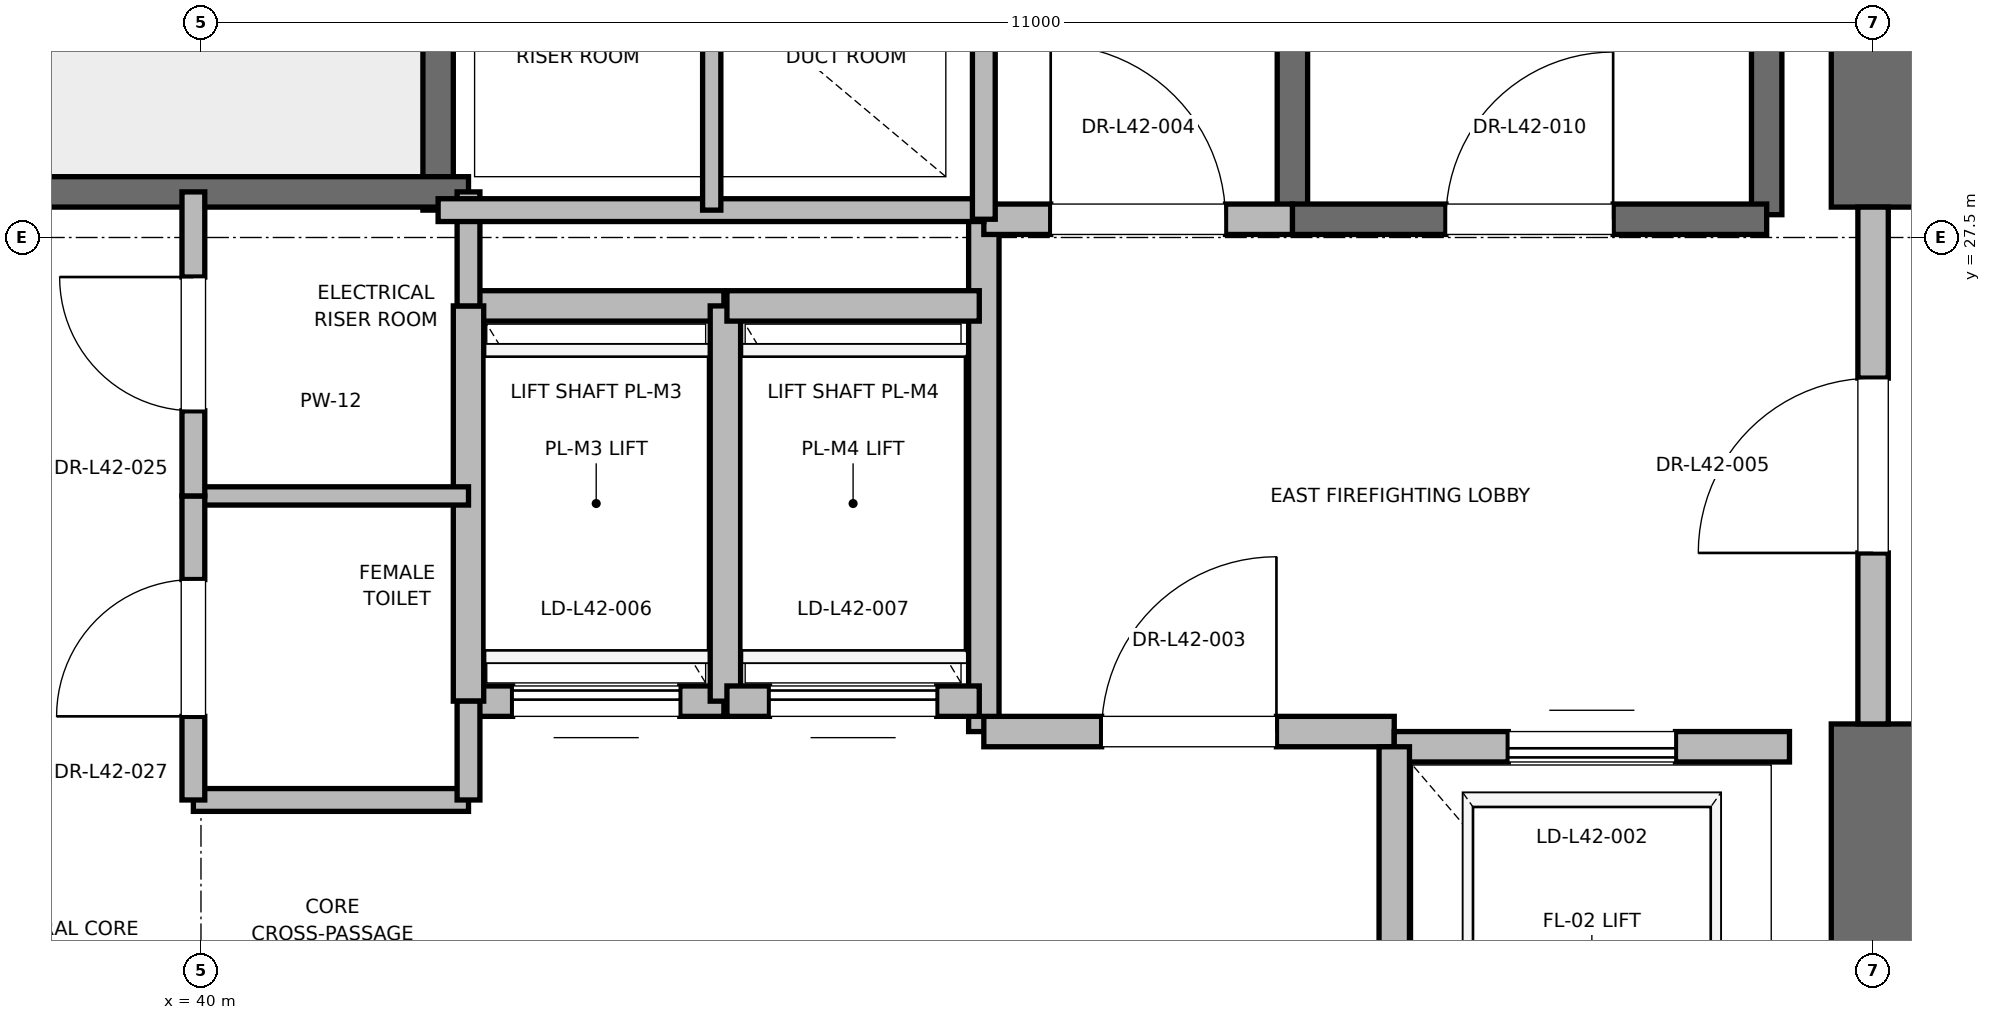
"""IFC4 building model, lengths in metres.
Left out: names, types, materials, properties, quantities, classifications, styles, units other than length and angle.
Written with IfcOpenShell. Run it as: python <this file> out.ifc"""

import sys

from ifc_helpers import new_model, si_unit, direction, frame, frame_2d, origin, place, context, subcontext, project, spatial, rectangle, extrude, element, fill, save


model = new_model("IFC4")
c1 = context("Model", 3, precision=1e-05, world=origin(), true_north=direction((0.0, 1.0)))
c2 = subcontext(c1, "Body", "Model", "MODEL_VIEW")
j1 = project(units=[si_unit("LENGTHUNIT", "METRE"), si_unit("PLANEANGLEUNIT", "RADIAN")], contexts=[c1])
p1 = place(None, origin())
s1 = spatial("IfcSite", under=j1, at=p1, CompositionType="ELEMENT")
p2 = place(p1, origin())
s2 = spatial("IfcBuilding", under=s1, at=p2, CompositionType="ELEMENT")
p3 = place(p2, frame((0.0, 0.0, 180.4)))
s3 = spatial("IfcBuildingStorey", under=s2, at=p3, CompositionType="ELEMENT", Elevation=180.4)
p4 = place(p3, frame((51.0, 18.5, 0.0), z_axis=(0.0, 0.0, 1.0), x_axis=(0.0, 1.0, 0.0)))
e1 = element("IfcWall", 1, at=p4, inside=s3, PredefinedType="SHEAR", context=c2, shape_type="SweptSolid", body=[
    extrude(rectangle(XDim=5.8, YDim=0.55, at=frame_2d((2.9, 0.0))), origin(), (0.0, 0.0, 1.0), 3.7),
])
p5 = place(p3, frame((51.0, 27.7, 0.0), z_axis=(0.0, 0.0, 1.0), x_axis=(0.0, 1.0, 0.0)))
e2 = element("IfcWall", 2, at=p5, inside=s3, PredefinedType="SHEAR", context=c2, shape_type="SweptSolid", body=[
    extrude(rectangle(XDim=8.8, YDim=0.55, at=frame_2d((4.4, 0.0))), origin(), (0.0, 0.0, 1.0), 3.7),
])
p6 = place(p3, frame((50.3, 27.65, 0.0), z_axis=(0.0, 0.0, 1.0), x_axis=(0.0, 1.0, 0.0)))
e3 = element("IfcWall", 3, at=p6, inside=s3, PredefinedType="SOLIDWALL", context=c2, shape_type="SweptSolid", body=[
    extrude(rectangle(XDim=8.15, YDim=0.2, at=frame_2d((4.075, 0.0))), origin(), (0.0, 0.0, 1.0), 3.7),
])
p7 = place(p3, frame((47.18, 27.62, 0.0), z_axis=(0.0, 0.0, 1.0), x_axis=(0.0, 1.0, 0.0)))
e4 = element("IfcWall", 4, at=p7, inside=s3, PredefinedType="SOLIDWALL", context=c2, shape_type="SweptSolid", body=[
    extrude(rectangle(XDim=8.18, YDim=0.2, at=frame_2d((4.09, 0.0))), origin(), (0.0, 0.0, 1.0), 3.7),
])
p8 = place(p3, frame((47.18, 27.62, 0.0), z_axis=(0.0, 0.0, 1.0), x_axis=(1.0, 0.0, 0.0)))
e5 = element("IfcWall", 5, at=p8, inside=s3, PredefinedType="SOLIDWALL", context=c2, shape_type="SweptSolid", body=[
    extrude(rectangle(XDim=3.12, YDim=0.2, at=frame_2d((1.56, 0.0))), origin(), (0.0, 0.0, 1.0), 3.7),
])
p9 = place(p8, frame((1.01, 0.0, 0.0)))
e6 = element("IfcOpeningElement", 6, at=p9, cuts=e5, PredefinedType="OPENING", context=c2, shape_type="SweptSolid", body=[
    extrude(rectangle(XDim=1.1, YDim=2.15, at=frame_2d((0.55, 1.075))), frame((0.0, 0.1, 0.0), z_axis=(0.0, -1.0, 0.0), x_axis=(1.0, 0.0, 0.0)), (0.0, 0.0, 1.0), 0.2),
])
p10 = place(p3, frame((41.56, 27.68, 0.0), z_axis=(0.0, 0.0, 1.0), x_axis=(0.0, 1.0, 0.0)))
e7 = element("IfcWall", 7, at=p10, inside=s3, PredefinedType="SOLIDWALL", context=c2, shape_type="SweptSolid", body=[
    extrude(rectangle(XDim=8.57, YDim=0.2, at=frame_2d((4.285, 0.0))), origin(), (0.0, 0.0, 1.0), 3.7),
])
p11 = place(p3, frame((38.44, 27.8, 0.0), z_axis=(0.0, 0.0, 1.0), x_axis=(1.0, 0.0, 0.0)))
e8 = element("IfcWall", 8, at=p11, inside=s3, PredefinedType="SOLIDWALL", context=c2, shape_type="SweptSolid", body=[
    extrude(rectangle(XDim=3.32, YDim=0.2, at=frame_2d((1.66, 0.0))), origin(), (0.0, 0.0, 1.0), 3.7),
])
p12 = place(p3, frame((45.15, 24.25, 0.0), z_axis=(0.0, 0.0, 1.0), x_axis=(0.0, 1.0, 0.0)))
e9 = element("IfcWall", 9, at=p12, inside=s3, PredefinedType="PARTITIONING", context=c2, shape_type="SweptSolid", body=[
    extrude(rectangle(XDim=3.37, YDim=0.2, at=frame_2d((1.685, 0.0))), origin(), (0.0, 0.0, 1.0), 3.7),
])
p13 = place(p3, frame((45.15, 24.25, 0.0), z_axis=(0.0, 0.0, 1.0), x_axis=(1.0, 0.0, 0.0)))
e10 = element("IfcWall", 10, at=p13, inside=s3, PredefinedType="PARTITIONING", context=c2, shape_type="SweptSolid", body=[
    extrude(rectangle(XDim=2.7, YDim=0.2, at=frame_2d((1.35, 0.0))), origin(), (0.0, 0.0, 1.0), 3.7),
])
p14 = place(p13, frame((0.775, 0.0, 0.0)))
e11 = element("IfcOpeningElement", 11, at=p14, cuts=e10, PredefinedType="OPENING", context=c2, shape_type="SweptSolid", body=[
    extrude(rectangle(XDim=1.15, YDim=2.2, at=frame_2d((0.575, 1.1))), frame((0.0, 0.1, 0.0), z_axis=(0.0, -1.0, 0.0), x_axis=(1.0, 0.0, 0.0)), (0.0, 0.0, 1.0), 0.2),
])
p15 = place(p3, frame((45.15, 27.62, 0.0), z_axis=(0.0, 0.0, 1.0), x_axis=(1.0, 0.0, 0.0)))
e12 = element("IfcWall", 12, at=p15, inside=s3, PredefinedType="PARTITIONING", context=c2, shape_type="SweptSolid", body=[
    extrude(rectangle(XDim=2.03, YDim=0.2, at=frame_2d((1.015, 0.0))), origin(), (0.0, 0.0, 1.0), 3.7),
])
p16 = place(p15, frame((0.44, 0.0, 0.0)))
e13 = element("IfcOpeningElement", 13, at=p16, cuts=e12, PredefinedType="OPENING", context=c2, shape_type="SweptSolid", body=[
    extrude(rectangle(XDim=1.15, YDim=2.2, at=frame_2d((0.575, 1.1))), frame((0.0, 0.1, 0.0), z_axis=(0.0, -1.0, 0.0), x_axis=(1.0, 0.0, 0.0)), (0.0, 0.0, 1.0), 0.2),
])
p17 = place(p3, frame((51.0, 24.3, 0.0), z_axis=(0.0, 0.0, 1.0), x_axis=(0.0, 1.0, 0.0)))
e14 = element("IfcWall", 14, at=p17, inside=s3, PredefinedType="PARTITIONING", context=c2, shape_type="SweptSolid", body=[
    extrude(rectangle(XDim=3.4, YDim=0.2, at=frame_2d((1.7, 0.0))), origin(), (0.0, 0.0, 1.0), 2.68),
])
p18 = place(p17, frame((1.125, 0.0, 0.0)))
e15 = element("IfcOpeningElement", 15, at=p18, cuts=e14, PredefinedType="OPENING", context=c2, shape_type="SweptSolid", body=[
    extrude(rectangle(XDim=1.15, YDim=2.2, at=frame_2d((0.575, 1.1))), frame((0.0, 0.1, 0.0), z_axis=(0.0, -1.0, 0.0), x_axis=(1.0, 0.0, 0.0)), (0.0, 0.0, 1.0), 0.2),
])
p19 = place(p3, frame((50.45, 24.15, 0.0), z_axis=(0.0, 0.0, 1.0), x_axis=(-1.0, 0.0, 0.0)))
e16 = element("IfcWall", 16, at=p19, inside=s3, PredefinedType="SOLIDWALL", context=c2, shape_type="SweptSolid", body=[
    extrude(rectangle(XDim=2.6, YDim=0.2, at=frame_2d((1.3, 0.0))), origin(), (0.0, 0.0, 1.0), 2.68),
])
p20 = place(p19, frame((0.75, 0.0, 0.0)))
e17 = element("IfcOpeningElement", 17, at=p20, cuts=e16, PredefinedType="OPENING", context=c2, shape_type="SweptSolid", body=[
    extrude(rectangle(XDim=1.1, YDim=2.2, at=frame_2d((0.55, 1.1))), frame((0.0, 0.1, 0.0), z_axis=(0.0, -1.0, 0.0), x_axis=(1.0, 0.0, 0.0)), (0.0, 0.0, 1.0), 0.2),
])
p21 = place(p3, frame((47.85, 24.15, 0.0), z_axis=(0.0, 0.0, 1.0), x_axis=(0.0, -1.0, 0.0)))
e18 = element("IfcWall", 18, at=p21, inside=s3, PredefinedType="SOLIDWALL", context=c2, shape_type="SweptSolid", body=[
    extrude(rectangle(XDim=3.0, YDim=0.2, at=frame_2d((1.5, 0.0))), origin(), (0.0, 0.0, 1.0), 3.7),
])
p22 = place(p3, frame((41.76, 24.45, 0.0), z_axis=(0.0, 0.0, 1.0), x_axis=(1.0, 0.0, 0.0)))
e19 = element("IfcWall", 19, at=p22, inside=s3, PredefinedType="SOLIDWALL", context=c2, shape_type="SweptSolid", body=[
    extrude(rectangle(XDim=1.68, YDim=0.2, at=frame_2d((0.84, 0.0))), origin(), (0.0, 0.0, 1.0), 3.7),
])
p23 = place(p22, frame((0.29, 0.0, 0.0)))
e20 = element("IfcOpeningElement", 20, at=p23, cuts=e19, PredefinedType="OPENING", context=c2, shape_type="SweptSolid", body=[
    extrude(rectangle(XDim=1.1, YDim=2.2, at=frame_2d((0.55, 1.1))), frame((0.0, 0.1, 0.0), z_axis=(0.0, -1.0, 0.0), x_axis=(1.0, 0.0, 0.0)), (0.0, 0.0, 1.0), 0.2),
])
p24 = place(p3, frame((43.44, 27.05, 0.0), z_axis=(0.0, 0.0, 1.0), x_axis=(-1.0, 0.0, 0.0)))
e21 = element("IfcWall", 21, at=p24, inside=s3, PredefinedType="SOLIDWALL", context=c2, shape_type="SweptSolid", body=[
    extrude(rectangle(XDim=1.68, YDim=0.2, at=frame_2d((0.84, 0.0))), origin(), (0.0, 0.0, 1.0), 3.7),
])
for number, where, z_axis, x_axis in (
    (22, (41.76, 27.05, 0.0), (0.0, 0.0, 1.0), (0.0, -1.0, 0.0)),
    (23, (43.45, 24.45, 0.0), (0.0, 0.0, 1.0), (0.0, 1.0, 0.0)),
):
    element("IfcWall", number, at=place(p3, frame(where, z_axis=z_axis, x_axis=x_axis)), inside=s3, PredefinedType="SOLIDWALL", context=c2, shape_type="SweptSolid", body=[
        extrude(rectangle(XDim=2.6, YDim=0.2, at=frame_2d((1.3, 0.0))), origin(), (0.0, 0.0, 1.0), 3.7),
    ])
p25 = place(p3, frame((43.46, 24.45, 0.0), z_axis=(0.0, 0.0, 1.0), x_axis=(1.0, 0.0, 0.0)))
e24 = element("IfcWall", 24, at=p25, inside=s3, PredefinedType="SOLIDWALL", context=c2, shape_type="SweptSolid", body=[
    extrude(rectangle(XDim=1.66, YDim=0.2, at=frame_2d((0.83, 0.0))), origin(), (0.0, 0.0, 1.0), 3.7),
])
p26 = place(p25, frame((0.28, 0.0, 0.0)))
e25 = element("IfcOpeningElement", 25, at=p26, cuts=e24, PredefinedType="OPENING", context=c2, shape_type="SweptSolid", body=[
    extrude(rectangle(XDim=1.1, YDim=2.2, at=frame_2d((0.55, 1.1))), frame((0.0, 0.1, 0.0), z_axis=(0.0, -1.0, 0.0), x_axis=(1.0, 0.0, 0.0)), (0.0, 0.0, 1.0), 0.2),
])
p27 = place(p3, frame((45.12, 27.05, 0.0), z_axis=(0.0, 0.0, 1.0), x_axis=(-1.0, 0.0, 0.0)))
e26 = element("IfcWall", 26, at=p27, inside=s3, PredefinedType="SOLIDWALL", context=c2, shape_type="SweptSolid", body=[
    extrude(rectangle(XDim=1.66, YDim=0.2, at=frame_2d((0.83, 0.0))), origin(), (0.0, 0.0, 1.0), 3.7),
])
p28 = place(p3, frame((39.95, 23.8, 0.0), z_axis=(0.0, 0.0, 1.0), x_axis=(1.0, 0.0, 0.0)))
e27 = element("IfcWall", 27, at=p28, inside=s3, PredefinedType="PARTITIONING", context=c2, shape_type="SweptSolid", body=[
    extrude(rectangle(XDim=1.81, YDim=0.15, at=frame_2d((0.905, 0.0))), origin(), (0.0, 0.0, 1.0), 2.85),
])
p29 = place(p3, frame((39.95, 25.8, 0.0), z_axis=(0.0, 0.0, 1.0), x_axis=(1.0, 0.0, 0.0)))
e28 = element("IfcWall", 28, at=p29, inside=s3, PredefinedType="PARTITIONING", context=c2, shape_type="SweptSolid", body=[
    extrude(rectangle(XDim=1.81, YDim=0.12, at=frame_2d((0.905, 0.0))), origin(), (0.0, 0.0, 1.0), 2.85),
])
p30 = place(p3, frame((41.76, 23.8, 0.0), z_axis=(0.0, 0.0, 1.0), x_axis=(0.0, 1.0, 0.0)))
e29 = element("IfcWall", 29, at=p30, inside=s3, PredefinedType="PARTITIONING", context=c2, shape_type="SweptSolid", body=[
    extrude(rectangle(XDim=0.65, YDim=0.15, at=frame_2d((0.325, 0.0))), origin(), (0.0, 0.0, 1.0), 2.85),
])
p31 = place(p3, frame((41.76, 27.05, 0.0), z_axis=(0.0, 0.0, 1.0), x_axis=(0.0, 1.0, 0.0)))
e30 = element("IfcWall", 30, at=p31, inside=s3, PredefinedType="PARTITIONING", context=c2, shape_type="SweptSolid", body=[
    extrude(rectangle(XDim=0.75, YDim=0.15, at=frame_2d((0.375, 0.0))), origin(), (0.0, 0.0, 1.0), 2.85),
])
p32 = place(p3, frame((39.95, 23.8, 0.0), z_axis=(0.0, 0.0, 1.0), x_axis=(0.0, 1.0, 0.0)))
e31 = element("IfcWall", 31, at=p32, inside=s3, PredefinedType="PARTITIONING", context=c2, shape_type="SweptSolid", body=[
    extrude(rectangle(XDim=2.0, YDim=0.15, at=frame_2d((1.0, 0.0))), origin(), (0.0, 0.0, 1.0), 2.85),
])
p33 = place(p32, frame((0.55, 0.0, 0.0)))
e32 = element("IfcOpeningElement", 32, at=p33, cuts=e31, PredefinedType="OPENING", context=c2, shape_type="SweptSolid", body=[
    extrude(rectangle(XDim=0.9, YDim=2.1, at=frame_2d((0.45, 1.05))), frame((0.0, 0.075, 0.0), z_axis=(0.0, -1.0, 0.0), x_axis=(1.0, 0.0, 0.0)), (0.0, 0.0, 1.0), 0.15),
])
p34 = place(p3, frame((39.95, 25.8, 0.0), z_axis=(0.0, 0.0, 1.0), x_axis=(0.0, 1.0, 0.0)))
e33 = element("IfcWall", 33, at=p34, inside=s3, PredefinedType="PARTITIONING", context=c2, shape_type="SweptSolid", body=[
    extrude(rectangle(XDim=2.0, YDim=0.15, at=frame_2d((1.0, 0.0))), origin(), (0.0, 0.0, 1.0), 2.85),
])
p35 = place(p34, frame((0.56, 0.0, 0.0)))
e34 = element("IfcOpeningElement", 34, at=p35, cuts=e33, PredefinedType="OPENING", context=c2, shape_type="SweptSolid", body=[
    extrude(rectangle(XDim=0.88, YDim=2.1, at=frame_2d((0.44, 1.05))), frame((0.0, 0.075, 0.0), z_axis=(0.0, -1.0, 0.0), x_axis=(1.0, 0.0, 0.0)), (0.0, 0.0, 1.0), 0.15),
])
p36 = place(p3, frame((41.56, 27.68, 0.0), z_axis=(0.0, 0.0, 1.0), x_axis=(1.0, 0.0, 0.0)))
e35 = element("IfcWall", 35, at=p36, inside=s3, PredefinedType="PARTITIONING", context=c2, shape_type="SweptSolid", body=[
    extrude(rectangle(XDim=3.59, YDim=0.15, at=frame_2d((1.795, 0.0))), origin(), (0.0, 0.0, 1.0), 2.85),
])
p37 = place(p3, frame((45.15, 27.62, 0.0), z_axis=(0.0, 0.0, 1.0), x_axis=(0.0, 1.0, 0.0)))
e36 = element("IfcWall", 36, at=p37, inside=s3, PredefinedType="PARTITIONING", context=c2, shape_type="SweptSolid", body=[
    extrude(rectangle(XDim=3.1, YDim=0.15, at=frame_2d((1.55, 0.0))), origin(), (0.0, 0.0, 1.0), 2.85),
])
p38 = place(p3, frame((43.36, 27.68, 0.0), z_axis=(0.0, 0.0, 1.0), x_axis=(0.0, 1.0, 0.0)))
e37 = element("IfcWall", 37, at=p38, inside=s3, PredefinedType="PARTITIONING", context=c2, shape_type="SweptSolid", body=[
    extrude(rectangle(XDim=3.04, YDim=0.12, at=frame_2d((1.52, 0.0))), origin(), (0.0, 0.0, 1.0), 2.85),
])
p39 = place(p9, origin())
e38 = element("IfcDoor", 38, at=p39, inside=s3, OperationType="SINGLE_SWING_RIGHT", PredefinedType="DOOR", context=c2, shape_type="SweptSolid", body=[
    extrude(rectangle(XDim=1.1, YDim=2.15, at=frame_2d((0.55, 1.075))), frame((0.0, 0.025, 0.0), z_axis=(0.0, -1.0, 0.0), x_axis=(1.0, 0.0, 0.0)), (0.0, 0.0, 1.0), 0.05),
])
fill(e6, e38)
p40 = place(p14, origin())
e39 = element("IfcDoor", 39, at=p40, inside=s3, OperationType="SINGLE_SWING_RIGHT", PredefinedType="DOOR", context=c2, shape_type="SweptSolid", body=[
    extrude(rectangle(XDim=1.15, YDim=2.2, at=frame_2d((0.575, 1.1))), frame((0.0, 0.025, 0.0), z_axis=(0.0, -1.0, 0.0), x_axis=(1.0, 0.0, 0.0)), (0.0, 0.0, 1.0), 0.05),
])
fill(e11, e39)
p41 = place(p16, origin())
e40 = element("IfcDoor", 40, at=p41, inside=s3, OperationType="SINGLE_SWING_LEFT", PredefinedType="DOOR", context=c2, shape_type="SweptSolid", body=[
    extrude(rectangle(XDim=1.15, YDim=2.2, at=frame_2d((0.575, 1.1))), frame((0.0, 0.025, 0.0), z_axis=(0.0, -1.0, 0.0), x_axis=(1.0, 0.0, 0.0)), (0.0, 0.0, 1.0), 0.05),
])
fill(e13, e40)
p42 = place(p18, origin())
e41 = element("IfcDoor", 41, at=p42, inside=s3, OperationType="SINGLE_SWING_LEFT", PredefinedType="DOOR", context=c2, shape_type="SweptSolid", body=[
    extrude(rectangle(XDim=1.15, YDim=2.2, at=frame_2d((0.575, 1.1))), frame((0.0, 0.025, 0.0), z_axis=(0.0, -1.0, 0.0), x_axis=(1.0, 0.0, 0.0)), (0.0, 0.0, 1.0), 0.05),
])
fill(e15, e41)
p43 = place(p20, origin())
e42 = element("IfcDoor", 42, at=p43, inside=s3, OperationType="SLIDING_TO_RIGHT", PredefinedType="DOOR", context=c2, shape_type="SweptSolid", body=[
    extrude(rectangle(XDim=1.1, YDim=2.2, at=frame_2d((0.55, 1.1))), frame((0.0, 0.025, 0.0), z_axis=(0.0, -1.0, 0.0), x_axis=(1.0, 0.0, 0.0)), (0.0, 0.0, 1.0), 0.05),
])
fill(e17, e42)
p44 = place(p23, origin())
e43 = element("IfcDoor", 43, at=p44, inside=s3, OperationType="SLIDING_TO_RIGHT", PredefinedType="DOOR", context=c2, shape_type="SweptSolid", body=[
    extrude(rectangle(XDim=1.1, YDim=2.2, at=frame_2d((0.55, 1.1))), frame((0.0, 0.025, 0.0), z_axis=(0.0, -1.0, 0.0), x_axis=(1.0, 0.0, 0.0)), (0.0, 0.0, 1.0), 0.05),
])
fill(e20, e43)
p45 = place(p26, origin())
e44 = element("IfcDoor", 44, at=p45, inside=s3, OperationType="SLIDING_TO_RIGHT", PredefinedType="DOOR", context=c2, shape_type="SweptSolid", body=[
    extrude(rectangle(XDim=1.1, YDim=2.2, at=frame_2d((0.55, 1.1))), frame((0.0, 0.025, 0.0), z_axis=(0.0, -1.0, 0.0), x_axis=(1.0, 0.0, 0.0)), (0.0, 0.0, 1.0), 0.05),
])
fill(e25, e44)
p46 = place(p33, origin())
e45 = element("IfcDoor", 45, at=p46, inside=s3, OperationType="SINGLE_SWING_LEFT", PredefinedType="DOOR", context=c2, shape_type="SweptSolid", body=[
    extrude(rectangle(XDim=0.9, YDim=2.1, at=frame_2d((0.45, 1.05))), frame((0.0, 0.025, 0.0), z_axis=(0.0, -1.0, 0.0), x_axis=(1.0, 0.0, 0.0)), (0.0, 0.0, 1.0), 0.05),
])
fill(e32, e45)
p47 = place(p35, origin())
e46 = element("IfcDoor", 46, at=p47, inside=s3, OperationType="SINGLE_SWING_RIGHT", PredefinedType="DOOR", context=c2, shape_type="SweptSolid", body=[
    extrude(rectangle(XDim=0.88, YDim=2.1, at=frame_2d((0.44, 1.05))), frame((0.0, 0.025, 0.0), z_axis=(0.0, -1.0, 0.0), x_axis=(1.0, 0.0, 0.0)), (0.0, 0.0, 1.0), 0.05),
])
fill(e34, e46)
save(model, sys.argv[1])
